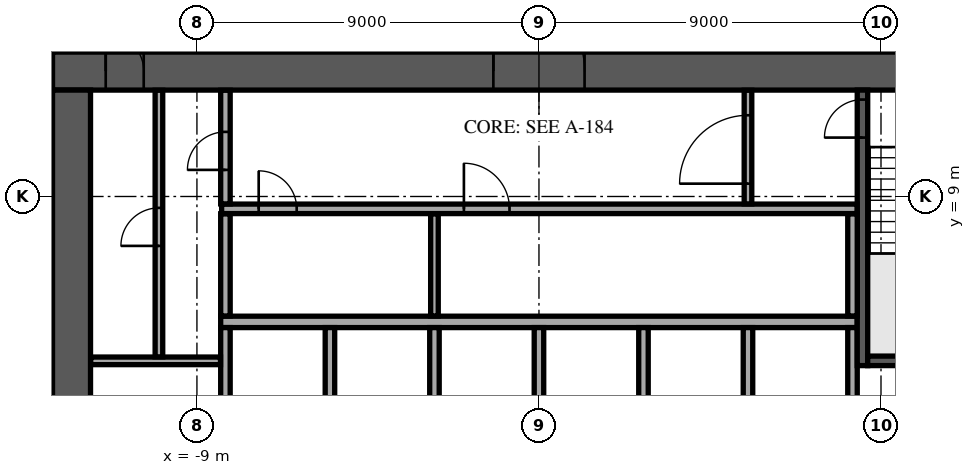
"""IFC4 building model, lengths in metres.
Left out: names, types, materials, properties, quantities, classifications, styles, units other than length and angle.
Written with IfcOpenShell. Run it as: python <this file> out.ifc"""

import sys

from ifc_helpers import new_model, si_unit, direction, frame, frame_2d, origin, place, context, subcontext, project, spatial, rectangle, extrude, element, fill, save


model = new_model("IFC4")
c1 = context("Model", 3, precision=1e-05, world=origin(), true_north=direction((0.0, 1.0)))
c2 = subcontext(c1, "Body", "Model", "MODEL_VIEW")
j1 = project(units=[si_unit("LENGTHUNIT", "METRE"), si_unit("PLANEANGLEUNIT", "RADIAN")], contexts=[c1])
p1 = place(None, origin())
s1 = spatial("IfcSite", under=j1, at=p1, CompositionType="ELEMENT")
p2 = place(p1, origin())
s2 = spatial("IfcBuilding", under=s1, at=p2, CompositionType="ELEMENT")
p3 = place(p2, frame((0.0, 0.0, 155.7)))
s3 = spatial("IfcBuildingStorey", under=s2, at=p3, CompositionType="ELEMENT", Elevation=155.7)
p4 = place(p3, frame((-12.8, 12.3, 0.0), z_axis=(0.0, 0.0, 1.0), x_axis=(1.0, 0.0, 0.0)))
e1 = element("IfcWall", 1, at=p4, inside=s3, PredefinedType="SHEAR", context=c2, shape_type="SweptSolid", body=[
    extrude(rectangle(XDim=25.6, YDim=1.0, at=frame_2d((12.8, 0.0))), origin(), (0.0, 0.0, 1.0), 3.6),
])
p5 = place(p4, frame((11.6, 0.0, 0.0)))
e2 = element("IfcOpeningElement", 2, at=p5, cuts=e1, PredefinedType="OPENING", context=c2, shape_type="SweptSolid", body=[
    extrude(rectangle(XDim=2.4, YDim=2.4, at=frame_2d((1.2, 1.2))), frame((0.0, 0.51, 0.0), z_axis=(0.0, -1.0, 0.0), x_axis=(1.0, 0.0, 0.0)), (0.0, 0.0, 1.0), 1.02),
])
p6 = place(p4, frame((22.425, 0.0, 0.0)))
e3 = element("IfcOpeningElement", 3, at=p6, cuts=e1, PredefinedType="OPENING", context=c2, shape_type="SweptSolid", body=[
    extrude(rectangle(XDim=1.2, YDim=2.1, at=frame_2d((0.6, 1.05))), frame((0.0, 0.51, 0.0), z_axis=(0.0, -1.0, 0.0), x_axis=(1.0, 0.0, 0.0)), (0.0, 0.0, 1.0), 1.02),
])
p7 = place(p4, frame((1.4, 0.0, 0.0)))
e4 = element("IfcOpeningElement", 4, at=p7, cuts=e1, PredefinedType="OPENING", context=c2, shape_type="SweptSolid", body=[
    extrude(rectangle(XDim=1.0, YDim=2.1, at=frame_2d((0.5, 1.05))), frame((0.0, 0.51, 0.0), z_axis=(0.0, -1.0, 0.0), x_axis=(1.0, 0.0, 0.0)), (0.0, 0.0, 1.0), 1.02),
])
p8 = place(p3, frame((-12.3, -11.8, 0.0), z_axis=(0.0, 0.0, 1.0), x_axis=(0.0, 1.0, 0.0)))
e5 = element("IfcWall", 5, at=p8, inside=s3, PredefinedType="SHEAR", context=c2, shape_type="SweptSolid", body=[
    extrude(rectangle(XDim=23.6, YDim=1.0, at=frame_2d((11.8, 0.0))), origin(), (0.0, 0.0, 1.0), 3.6),
])
p9 = place(p8, frame((10.6, 0.0, 0.0)))
e6 = element("IfcOpeningElement", 6, at=p9, cuts=e5, PredefinedType="OPENING", context=c2, shape_type="SweptSolid", body=[
    extrude(rectangle(XDim=2.4, YDim=2.4, at=frame_2d((1.2, 1.2))), frame((0.0, 0.51, 0.0), z_axis=(0.0, -1.0, 0.0), x_axis=(1.0, 0.0, 0.0)), (0.0, 0.0, 1.0), 1.02),
])
p10 = place(p3, frame((-8.375, 5.7, 0.0), z_axis=(0.0, 0.0, 1.0), x_axis=(1.0, 0.0, 0.0)))
e7 = element("IfcWall", 7, at=p10, inside=s3, PredefinedType="SOLIDWALL", context=c2, shape_type="SweptSolid", body=[
    extrude(rectangle(XDim=16.75, YDim=0.3, at=frame_2d((8.375, 0.0))), origin(), (0.0, 0.0, 1.0), 3.6),
])
for number, where, z_axis, x_axis in (
    (8, (-8.25, 2.85, 0.0), (0.0, 0.0, 1.0), (0.0, 1.0, 0.0)),
    (9, (-5.5, 2.85, 0.0), (0.0, 0.0, 1.0), (0.0, 1.0, 0.0)),
    (10, (-2.75, 2.85, 0.0), (0.0, 0.0, 1.0), (0.0, 1.0, 0.0)),
    (11, (0.0, 2.85, 0.0), (0.0, 0.0, 1.0), (0.0, 1.0, 0.0)),
    (12, (2.75, 2.85, 0.0), (0.0, 0.0, 1.0), (0.0, 1.0, 0.0)),
    (13, (5.5, 2.85, 0.0), (0.0, 0.0, 1.0), (0.0, 1.0, 0.0)),
    (14, (8.25, 2.85, 0.0), (0.0, 0.0, 1.0), (0.0, 1.0, 0.0)),
):
    element("IfcWall", number, at=place(p3, frame(where, z_axis=z_axis, x_axis=x_axis)), inside=s3, PredefinedType="SOLIDWALL", context=c2, shape_type="SweptSolid", body=[
        extrude(rectangle(XDim=2.7, YDim=0.25, at=frame_2d((1.35, 0.0))), origin(), (0.0, 0.0, 1.0), 3.6),
    ])
p11 = place(p3, frame((8.512, 4.55, 0.0), z_axis=(0.0, 0.0, 1.0), x_axis=(0.0, 1.0, 0.0)))
e15 = element("IfcWall", 15, at=p11, inside=s3, PredefinedType="SOLIDWALL", context=c2, shape_type="SweptSolid", body=[
    extrude(rectangle(XDim=7.25, YDim=0.275, at=frame_2d((3.625, 0.0))), origin(), (0.0, 0.0, 1.0), 3.6),
])
p12 = place(p11, frame((6.0, 0.0, 0.0)))
e16 = element("IfcOpeningElement", 16, at=p12, cuts=e15, PredefinedType="OPENING", context=c2, shape_type="SweptSolid", body=[
    extrude(rectangle(XDim=1.0, YDim=2.1, at=frame_2d((0.5, 1.05))), frame((0.0, 0.147, 0.0), z_axis=(0.0, -1.0, 0.0), x_axis=(1.0, 0.0, 0.0)), (0.0, 0.0, 1.0), 0.295),
])
p13 = place(p3, frame((8.65, 4.675, 0.0), z_axis=(0.0, 0.0, 1.0), x_axis=(1.0, 0.0, 0.0)))
e17 = element("IfcWall", 17, at=p13, inside=s3, PredefinedType="SOLIDWALL", context=c2, shape_type="SweptSolid", body=[
    extrude(rectangle(XDim=3.15, YDim=0.25, at=frame_2d((1.575, 0.0))), origin(), (0.0, 0.0, 1.0), 3.6),
])
p14 = place(p3, frame((-11.795, 4.675, 0.0), z_axis=(0.0, 0.0, 1.0), x_axis=(1.0, 0.0, 0.0)))
e18 = element("IfcWall", 18, at=p14, inside=s3, PredefinedType="PARTITIONING", context=c2, shape_type="SweptSolid", body=[
    extrude(rectangle(XDim=3.415, YDim=0.2, at=frame_2d((1.708, 0.0))), origin(), (0.0, 0.0, 1.0), 3.6),
])
p15 = place(p3, frame((-10.0, 4.78, 0.0), z_axis=(0.0, 0.0, 1.0), x_axis=(0.0, 1.0, 0.0)))
e19 = element("IfcWall", 19, at=p15, inside=s3, PredefinedType="PARTITIONING", context=c2, shape_type="SweptSolid", body=[
    extrude(rectangle(XDim=7.015, YDim=0.2, at=frame_2d((3.507, 0.0))), origin(), (0.0, 0.0, 1.0), 3.6),
])
p16 = place(p15, frame((2.92, 0.0, 0.0)))
e20 = element("IfcOpeningElement", 20, at=p16, cuts=e19, PredefinedType="OPENING", context=c2, shape_type="SweptSolid", body=[
    extrude(rectangle(XDim=1.0, YDim=2.1, at=frame_2d((0.5, 1.05))), frame((0.0, 0.11, 0.0), z_axis=(0.0, -1.0, 0.0), x_axis=(1.0, 0.0, 0.0)), (0.0, 0.0, 1.0), 0.22),
])
p17 = place(p3, frame((-8.25, 5.855, 0.0), z_axis=(0.0, 0.0, 1.0), x_axis=(0.0, 1.0, 0.0)))
e21 = element("IfcWall", 21, at=p17, inside=s3, PredefinedType="PARTITIONING", context=c2, shape_type="SweptSolid", body=[
    extrude(rectangle(XDim=2.69, YDim=0.25, at=frame_2d((1.345, 0.0))), origin(), (0.0, 0.0, 1.0), 3.6),
])
p18 = place(p3, frame((-2.75, 5.855, 0.0), z_axis=(0.0, 0.0, 1.0), x_axis=(0.0, 1.0, 0.0)))
e22 = element("IfcWall", 22, at=p18, inside=s3, PredefinedType="PARTITIONING", context=c2, shape_type="SweptSolid", body=[
    extrude(rectangle(XDim=2.69, YDim=0.2, at=frame_2d((1.345, 0.0))), origin(), (0.0, 0.0, 1.0), 3.6),
])
p19 = place(p3, frame((8.25, 5.855, 0.0), z_axis=(0.0, 0.0, 1.0), x_axis=(0.0, 1.0, 0.0)))
e23 = element("IfcWall", 23, at=p19, inside=s3, PredefinedType="PARTITIONING", context=c2, shape_type="SweptSolid", body=[
    extrude(rectangle(XDim=2.69, YDim=0.25, at=frame_2d((1.345, 0.0))), origin(), (0.0, 0.0, 1.0), 3.6),
])
p20 = place(p3, frame((-8.35, 8.675, 0.0), z_axis=(0.0, 0.0, 1.0), x_axis=(1.0, 0.0, 0.0)))
e24 = element("IfcWall", 24, at=p20, inside=s3, PredefinedType="PARTITIONING", context=c2, shape_type="SweptSolid", body=[
    extrude(rectangle(XDim=16.72, YDim=0.25, at=frame_2d((8.36, 0.0))), origin(), (0.0, 0.0, 1.0), 3.6),
])
p21 = place(p20, frame((0.975, 0.0, 0.0)))
e25 = element("IfcOpeningElement", 25, at=p21, cuts=e24, PredefinedType="OPENING", context=c2, shape_type="SweptSolid", body=[
    extrude(rectangle(XDim=1.0, YDim=2.1, at=frame_2d((0.5, 1.05))), frame((0.0, 0.135, 0.0), z_axis=(0.0, -1.0, 0.0), x_axis=(1.0, 0.0, 0.0)), (0.0, 0.0, 1.0), 0.27),
])
p22 = place(p20, frame((6.375, 0.0, 0.0)))
e26 = element("IfcOpeningElement", 26, at=p22, cuts=e24, PredefinedType="OPENING", context=c2, shape_type="SweptSolid", body=[
    extrude(rectangle(XDim=1.2, YDim=2.1, at=frame_2d((0.6, 1.05))), frame((0.0, 0.135, 0.0), z_axis=(0.0, -1.0, 0.0), x_axis=(1.0, 0.0, 0.0)), (0.0, 0.0, 1.0), 0.27),
])
p23 = place(p3, frame((-8.25, 8.805, 0.0), z_axis=(0.0, 0.0, 1.0), x_axis=(0.0, 1.0, 0.0)))
e27 = element("IfcWall", 27, at=p23, inside=s3, PredefinedType="PARTITIONING", context=c2, shape_type="SweptSolid", body=[
    extrude(rectangle(XDim=2.99, YDim=0.25, at=frame_2d((1.495, 0.0))), origin(), (0.0, 0.0, 1.0), 3.6),
])
p24 = place(p23, frame((0.895, 0.0, 0.0)))
e28 = element("IfcOpeningElement", 28, at=p24, cuts=e27, PredefinedType="OPENING", context=c2, shape_type="SweptSolid", body=[
    extrude(rectangle(XDim=1.0, YDim=2.1, at=frame_2d((0.5, 1.05))), frame((0.0, 0.135, 0.0), z_axis=(0.0, -1.0, 0.0), x_axis=(1.0, 0.0, 0.0)), (0.0, 0.0, 1.0), 0.27),
])
p25 = place(p3, frame((5.5, 8.805, 0.0), z_axis=(0.0, 0.0, 1.0), x_axis=(0.0, 1.0, 0.0)))
e29 = element("IfcWall", 29, at=p25, inside=s3, PredefinedType="PARTITIONING", context=c2, shape_type="SweptSolid", body=[
    extrude(rectangle(XDim=2.99, YDim=0.2, at=frame_2d((1.495, 0.0))), origin(), (0.0, 0.0, 1.0), 3.6),
])
p26 = place(p25, frame((0.532, 0.0, 0.0)))
e30 = element("IfcOpeningElement", 30, at=p26, cuts=e29, PredefinedType="OPENING", context=c2, shape_type="SweptSolid", body=[
    extrude(rectangle(XDim=1.8, YDim=2.1, at=frame_2d((0.9, 1.05))), frame((0.0, 0.11, 0.0), z_axis=(0.0, -1.0, 0.0), x_axis=(1.0, 0.0, 0.0)), (0.0, 0.0, 1.0), 0.22),
])
p27 = place(p3, frame((6.333, 35.233, 0.0), z_axis=(0.0, 0.0, 1.0), x_axis=(-0.83867264201, -0.544635841222, 0.0)))
e31 = element("IfcWall", 31, at=p27, inside=s3, PredefinedType="STANDARD", context=c2, shape_type="SweptSolid", body=[
    extrude(rectangle(XDim=49.376, YDim=0.6, at=frame_2d((24.688, 0.0))), origin(), (0.0, 0.0, 1.0), 3.6),
])
p28 = place(p27, frame((1.2, 0.0, 0.9)))
e32 = element("IfcOpeningElement", 32, at=p28, cuts=e31, PredefinedType="OPENING", context=c2, shape_type="SweptSolid", body=[
    extrude(rectangle(XDim=2.1, YDim=2.1, at=frame_2d((1.05, 1.05))), frame((0.0, 0.31, 0.0), z_axis=(0.0, -1.0, 0.0), x_axis=(1.0, 0.0, 0.0)), (0.0, 0.0, 1.0), 0.62),
])
p29 = place(p27, frame((5.7, 0.0, 0.9)))
e33 = element("IfcOpeningElement", 33, at=p29, cuts=e31, PredefinedType="OPENING", context=c2, shape_type="SweptSolid", body=[
    extrude(rectangle(XDim=2.1, YDim=2.1, at=frame_2d((1.05, 1.05))), frame((0.0, 0.31, 0.0), z_axis=(0.0, -1.0, 0.0), x_axis=(1.0, 0.0, 0.0)), (0.0, 0.0, 1.0), 0.62),
])
p30 = place(p27, frame((10.2, 0.0, 0.9)))
e34 = element("IfcOpeningElement", 34, at=p30, cuts=e31, PredefinedType="OPENING", context=c2, shape_type="SweptSolid", body=[
    extrude(rectangle(XDim=2.1, YDim=2.1, at=frame_2d((1.05, 1.05))), frame((0.0, 0.31, 0.0), z_axis=(0.0, -1.0, 0.0), x_axis=(1.0, 0.0, 0.0)), (0.0, 0.0, 1.0), 0.62),
])
p31 = place(p27, frame((14.7, 0.0, 0.9)))
e35 = element("IfcOpeningElement", 35, at=p31, cuts=e31, PredefinedType="OPENING", context=c2, shape_type="SweptSolid", body=[
    extrude(rectangle(XDim=2.1, YDim=2.1, at=frame_2d((1.05, 1.05))), frame((0.0, 0.31, 0.0), z_axis=(0.0, -1.0, 0.0), x_axis=(1.0, 0.0, 0.0)), (0.0, 0.0, 1.0), 0.62),
])
p32 = place(p27, frame((19.2, 0.0, 0.9)))
e36 = element("IfcOpeningElement", 36, at=p32, cuts=e31, PredefinedType="OPENING", context=c2, shape_type="SweptSolid", body=[
    extrude(rectangle(XDim=2.1, YDim=2.1, at=frame_2d((1.05, 1.05))), frame((0.0, 0.31, 0.0), z_axis=(0.0, -1.0, 0.0), x_axis=(1.0, 0.0, 0.0)), (0.0, 0.0, 1.0), 0.62),
])
p33 = place(p27, frame((23.7, 0.0, 0.9)))
e37 = element("IfcOpeningElement", 37, at=p33, cuts=e31, PredefinedType="OPENING", context=c2, shape_type="SweptSolid", body=[
    extrude(rectangle(XDim=2.1, YDim=2.1, at=frame_2d((1.05, 1.05))), frame((0.0, 0.31, 0.0), z_axis=(0.0, -1.0, 0.0), x_axis=(1.0, 0.0, 0.0)), (0.0, 0.0, 1.0), 0.62),
])
p34 = place(p27, frame((28.2, 0.0, 0.9)))
e38 = element("IfcOpeningElement", 38, at=p34, cuts=e31, PredefinedType="OPENING", context=c2, shape_type="SweptSolid", body=[
    extrude(rectangle(XDim=2.1, YDim=2.1, at=frame_2d((1.05, 1.05))), frame((0.0, 0.31, 0.0), z_axis=(0.0, -1.0, 0.0), x_axis=(1.0, 0.0, 0.0)), (0.0, 0.0, 1.0), 0.62),
])
p35 = place(p27, frame((32.7, 0.0, 0.9)))
e39 = element("IfcOpeningElement", 39, at=p35, cuts=e31, PredefinedType="OPENING", context=c2, shape_type="SweptSolid", body=[
    extrude(rectangle(XDim=2.1, YDim=2.1, at=frame_2d((1.05, 1.05))), frame((0.0, 0.31, 0.0), z_axis=(0.0, -1.0, 0.0), x_axis=(1.0, 0.0, 0.0)), (0.0, 0.0, 1.0), 0.62),
])
p36 = place(p27, frame((37.2, 0.0, 0.9)))
e40 = element("IfcOpeningElement", 40, at=p36, cuts=e31, PredefinedType="OPENING", context=c2, shape_type="SweptSolid", body=[
    extrude(rectangle(XDim=2.1, YDim=2.1, at=frame_2d((1.05, 1.05))), frame((0.0, 0.31, 0.0), z_axis=(0.0, -1.0, 0.0), x_axis=(1.0, 0.0, 0.0)), (0.0, 0.0, 1.0), 0.62),
])
p37 = place(p27, frame((41.7, 0.0, 0.9)))
e41 = element("IfcOpeningElement", 41, at=p37, cuts=e31, PredefinedType="OPENING", context=c2, shape_type="SweptSolid", body=[
    extrude(rectangle(XDim=2.1, YDim=2.1, at=frame_2d((1.05, 1.05))), frame((0.0, 0.31, 0.0), z_axis=(0.0, -1.0, 0.0), x_axis=(1.0, 0.0, 0.0)), (0.0, 0.0, 1.0), 0.62),
])
p38 = place(p27, frame((46.138, 0.0, 0.9)))
e42 = element("IfcOpeningElement", 42, at=p38, cuts=e31, PredefinedType="OPENING", context=c2, shape_type="SweptSolid", body=[
    extrude(rectangle(XDim=2.1, YDim=2.1, at=frame_2d((1.05, 1.05))), frame((0.0, 0.31, 0.0), z_axis=(0.0, -1.0, 0.0), x_axis=(1.0, 0.0, 0.0)), (0.0, 0.0, 1.0), 0.62),
])
p39 = place(p3, frame((-25.134, 6.331, 0.0), z_axis=(0.0, 0.0, 1.0), x_axis=(0.838655992286, 0.544661478904, 0.0)))
e43 = element("IfcWall", 43, at=p39, inside=s3, PredefinedType="PARTITIONING", context=c2, shape_type="SweptSolid", body=[
    extrude(rectangle(XDim=35.262, YDim=0.15, at=frame_2d((17.631, 0.0))), origin(), (0.0, 0.0, 1.0), 3.15),
])
p40 = place(p39, frame((0.55, 0.0, 0.0)))
e44 = element("IfcOpeningElement", 44, at=p40, cuts=e43, PredefinedType="OPENING", context=c2, shape_type="SweptSolid", body=[
    extrude(rectangle(XDim=1.0, YDim=2.1, at=frame_2d((0.5, 1.05))), frame((0.0, 0.085, 0.0), z_axis=(0.0, -1.0, 0.0), x_axis=(1.0, 0.0, 0.0)), (0.0, 0.0, 1.0), 0.17),
])
p41 = place(p39, frame((5.989, 0.0, 0.0)))
e45 = element("IfcOpeningElement", 45, at=p41, cuts=e43, PredefinedType="OPENING", context=c2, shape_type="SweptSolid", body=[
    extrude(rectangle(XDim=1.0, YDim=2.1, at=frame_2d((0.5, 1.05))), frame((0.0, 0.085, 0.0), z_axis=(0.0, -1.0, 0.0), x_axis=(1.0, 0.0, 0.0)), (0.0, 0.0, 1.0), 0.17),
])
p42 = place(p39, frame((17.183, 0.0, 0.0)))
e46 = element("IfcOpeningElement", 46, at=p42, cuts=e43, PredefinedType="OPENING", context=c2, shape_type="SweptSolid", body=[
    extrude(rectangle(XDim=1.0, YDim=2.1, at=frame_2d((0.5, 1.05))), frame((0.0, 0.085, 0.0), z_axis=(0.0, -1.0, 0.0), x_axis=(1.0, 0.0, 0.0)), (0.0, 0.0, 1.0), 0.17),
])
p43 = place(p39, frame((25.102, 0.0, 0.0)))
e47 = element("IfcOpeningElement", 47, at=p43, cuts=e43, PredefinedType="OPENING", context=c2, shape_type="SweptSolid", body=[
    extrude(rectangle(XDim=1.0, YDim=2.1, at=frame_2d((0.5, 1.05))), frame((0.0, 0.085, 0.0), z_axis=(0.0, -1.0, 0.0), x_axis=(1.0, 0.0, 0.0)), (0.0, 0.0, 1.0), 0.17),
])
p44 = place(p5, origin())
e48 = element("IfcDoor", 48, at=p44, inside=s3, OperationType="SINGLE_SWING_LEFT", PredefinedType="DOOR", context=c2, shape_type="SweptSolid", body=[
    extrude(rectangle(XDim=2.4, YDim=2.4, at=frame_2d((1.2, 1.2))), frame((0.0, 0.025, 0.0), z_axis=(0.0, -1.0, 0.0), x_axis=(1.0, 0.0, 0.0)), (0.0, 0.0, 1.0), 0.05),
])
fill(e2, e48)
p45 = place(p7, origin())
e49 = element("IfcDoor", 49, at=p45, inside=s3, OperationType="SINGLE_SWING_LEFT", PredefinedType="DOOR", context=c2, shape_type="SweptSolid", body=[
    extrude(rectangle(XDim=1.0, YDim=2.1, at=frame_2d((0.5, 1.05))), frame((0.0, 0.025, 0.0), z_axis=(0.0, -1.0, 0.0), x_axis=(1.0, 0.0, 0.0)), (0.0, 0.0, 1.0), 0.05),
])
fill(e4, e49)
p46 = place(p12, origin())
e50 = element("IfcDoor", 50, at=p46, inside=s3, OperationType="SINGLE_SWING_LEFT", PredefinedType="DOOR", context=c2, shape_type="SweptSolid", body=[
    extrude(rectangle(XDim=1.0, YDim=2.1, at=frame_2d((0.5, 1.05))), frame((0.0, 0.025, 0.0), z_axis=(0.0, -1.0, 0.0), x_axis=(1.0, 0.0, 0.0)), (0.0, 0.0, 1.0), 0.05),
])
fill(e16, e50)
p47 = place(p16, origin())
e51 = element("IfcDoor", 51, at=p47, inside=s3, OperationType="SINGLE_SWING_LEFT", PredefinedType="DOOR", context=c2, shape_type="SweptSolid", body=[
    extrude(rectangle(XDim=1.0, YDim=2.1, at=frame_2d((0.5, 1.05))), frame((0.0, 0.025, 0.0), z_axis=(0.0, -1.0, 0.0), x_axis=(1.0, 0.0, 0.0)), (0.0, 0.0, 1.0), 0.05),
])
fill(e20, e51)
p48 = place(p24, origin())
e52 = element("IfcDoor", 52, at=p48, inside=s3, OperationType="SINGLE_SWING_LEFT", PredefinedType="DOOR", context=c2, shape_type="SweptSolid", body=[
    extrude(rectangle(XDim=1.0, YDim=2.1, at=frame_2d((0.5, 1.05))), frame((0.0, 0.025, 0.0), z_axis=(0.0, -1.0, 0.0), x_axis=(1.0, 0.0, 0.0)), (0.0, 0.0, 1.0), 0.05),
])
fill(e28, e52)
p49 = place(p21, origin())
e53 = element("IfcDoor", 53, at=p49, inside=s3, OperationType="SINGLE_SWING_LEFT", PredefinedType="DOOR", context=c2, shape_type="SweptSolid", body=[
    extrude(rectangle(XDim=1.0, YDim=2.1, at=frame_2d((0.5, 1.05))), frame((0.0, 0.025, 0.0), z_axis=(0.0, -1.0, 0.0), x_axis=(1.0, 0.0, 0.0)), (0.0, 0.0, 1.0), 0.05),
])
fill(e25, e53)
p50 = place(p22, origin())
e54 = element("IfcDoor", 54, at=p50, inside=s3, OperationType="SINGLE_SWING_LEFT", PredefinedType="DOOR", context=c2, shape_type="SweptSolid", body=[
    extrude(rectangle(XDim=1.2, YDim=2.1, at=frame_2d((0.6, 1.05))), frame((0.0, 0.025, 0.0), z_axis=(0.0, -1.0, 0.0), x_axis=(1.0, 0.0, 0.0)), (0.0, 0.0, 1.0), 0.05),
])
fill(e26, e54)
p51 = place(p26, origin())
e55 = element("IfcDoor", 55, at=p51, inside=s3, OperationType="SINGLE_SWING_LEFT", PredefinedType="DOOR", context=c2, shape_type="SweptSolid", body=[
    extrude(rectangle(XDim=1.8, YDim=2.1, at=frame_2d((0.9, 1.05))), frame((0.0, 0.025, 0.0), z_axis=(0.0, -1.0, 0.0), x_axis=(1.0, 0.0, 0.0)), (0.0, 0.0, 1.0), 0.05),
])
fill(e30, e55)
save(model, sys.argv[1])
